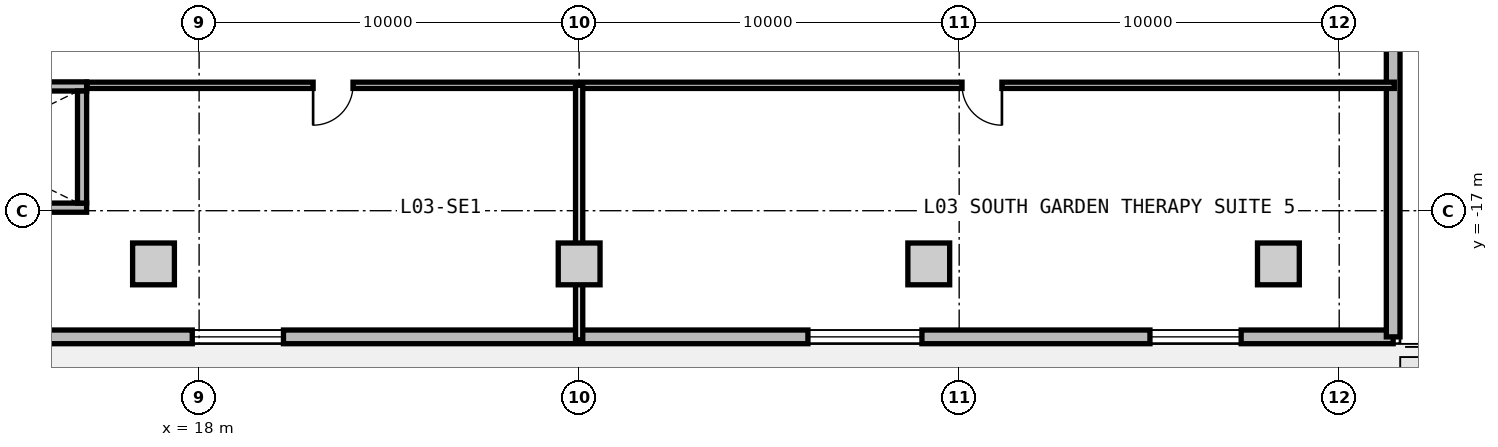
"""IFC4 building model, lengths in metres.
Left out: names, types, materials, properties, quantities, classifications, styles, units other than length and angle.
Written with IfcOpenShell. Run it as: python <this file> out.ifc"""

import sys

from ifc_helpers import new_model, si_unit, direction, frame, frame_2d, origin, origin_2d, place, context, subcontext, project, spatial, rectangle, extrude, source, transform, mapped, element, fill, save


model = new_model("IFC4")
c1 = context("Model", 3, precision=1e-05, world=origin(), true_north=direction((0.0, 1.0)))
c2 = subcontext(c1, "Body", "Model", "MODEL_VIEW")
j1 = project(units=[si_unit("LENGTHUNIT", "METRE"), si_unit("PLANEANGLEUNIT", "RADIAN")], contexts=[c1])
p1 = place(None, origin())
s1 = spatial("IfcSite", under=j1, at=p1, CompositionType="ELEMENT")
p2 = place(p1, origin())
s2 = spatial("IfcBuilding", under=s1, at=p2, CompositionType="ELEMENT")
p3 = place(p2, frame((0.0, 0.0, 12.6)))
s3 = spatial("IfcBuildingStorey", under=s2, at=p3, CompositionType="ELEMENT", Elevation=12.6)
m1 = source(origin(), c2, "Body", "SweptSolid", [
    extrude(rectangle(XDim=1.1, YDim=1.1, at=origin_2d()), origin(), (0.0, 0.0, 1.0), 4.2),
])
for number, where, z_axis, x_axis in (
    (1, (16.8, -18.4, 0.0), (0.0, 0.0, 1.0), (1.0, 0.0, 0.0)),
    (2, (28.0, -18.4, 0.0), (0.0, 0.0, 1.0), (1.0, 0.0, 0.0)),
    (3, (37.2, -18.4, 0.0), (0.0, 0.0, 1.0), (1.0, 0.0, 0.0)),
    (4, (46.4, -18.4, 0.0), (0.0, 0.0, 1.0), (1.0, 0.0, 0.0)),
):
    element("IfcColumn", number, at=place(p3, frame(where, z_axis=z_axis, x_axis=x_axis)), inside=s3, PredefinedType="COLUMN", context=c2, shape_type="MappedRepresentation", body=[
        mapped(m1, transform((0.0, 0.0, 0.0), x_axis=(1.0, 0.0, 0.0), y_axis=(0.0, 1.0, 0.0), z_axis=(0.0, 0.0, 1.0), scale=1.0)),
    ])
m2 = source(origin(), c2, "Body", "SweptSolid", [
    extrude(rectangle(XDim=98.84, YDim=0.36, at=frame_2d((49.42, 0.0))), origin(), (0.0, 0.0, 1.0), 3.88),
])
p4 = place(p3, frame((49.42, -20.32, 0.0), z_axis=(0.0, 0.0, 1.0), x_axis=(-1.0, 0.0, 0.0)))
e5 = element("IfcWall", 5, at=p4, inside=s3, PredefinedType="SOLIDWALL", context=c2, shape_type="MappedRepresentation", body=[
    mapped(m2, transform((0.0, 0.0, 0.0), x_axis=(1.0, 0.0, 0.0), y_axis=(0.0, 1.0, 0.0), z_axis=(0.0, 0.0, 1.0), scale=1.0)),
])
p5 = place(p4, frame((51.77, 0.0, 0.0)))
e6 = element("IfcOpeningElement", 6, at=p5, cuts=e5, PredefinedType="OPENING", context=c2, shape_type="SweptSolid", body=[
    extrude(rectangle(XDim=1.15, YDim=2.25, at=frame_2d((0.575, 1.125))), frame((0.0, 0.19, 0.0), z_axis=(0.0, -1.0, 0.0), x_axis=(1.0, 0.0, 0.0)), (0.0, 0.0, 1.0), 0.38),
])
p6 = place(p4, frame((4.0, 0.0, 0.85)))
e7 = element("IfcOpeningElement", 7, at=p6, cuts=e5, PredefinedType="OPENING", context=c2, shape_type="SweptSolid", body=[
    extrude(rectangle(XDim=2.4, YDim=2.2, at=frame_2d((1.2, 1.1))), frame((0.0, 0.19, 0.0), z_axis=(0.0, -1.0, 0.0), x_axis=(1.0, 0.0, 0.0)), (0.0, 0.0, 1.0), 0.38),
])
p7 = place(p4, frame((12.4, 0.0, 0.85)))
e8 = element("IfcOpeningElement", 8, at=p7, cuts=e5, PredefinedType="OPENING", context=c2, shape_type="SweptSolid", body=[
    extrude(rectangle(XDim=3.0, YDim=2.1, at=frame_2d((1.5, 1.05))), frame((0.0, 0.19, 0.0), z_axis=(0.0, -1.0, 0.0), x_axis=(1.0, 0.0, 0.0)), (0.0, 0.0, 1.0), 0.38),
])
p8 = place(p4, frame((29.2, 0.0, 0.85)))
e9 = element("IfcOpeningElement", 9, at=p8, cuts=e5, PredefinedType="OPENING", context=c2, shape_type="SweptSolid", body=[
    extrude(rectangle(XDim=2.4, YDim=2.2, at=frame_2d((1.2, 1.1))), frame((0.0, 0.19, 0.0), z_axis=(0.0, -1.0, 0.0), x_axis=(1.0, 0.0, 0.0)), (0.0, 0.0, 1.0), 0.38),
])
p9 = place(p4, frame((37.6, 0.0, 0.85)))
e10 = element("IfcOpeningElement", 10, at=p9, cuts=e5, PredefinedType="OPENING", context=c2, shape_type="SweptSolid", body=[
    extrude(rectangle(XDim=3.0, YDim=2.1, at=frame_2d((1.5, 1.05))), frame((0.0, 0.19, 0.0), z_axis=(0.0, -1.0, 0.0), x_axis=(1.0, 0.0, 0.0)), (0.0, 0.0, 1.0), 0.38),
])
p10 = place(p4, frame((62.8, 0.0, 0.85)))
e11 = element("IfcOpeningElement", 11, at=p10, cuts=e5, PredefinedType="OPENING", context=c2, shape_type="SweptSolid", body=[
    extrude(rectangle(XDim=3.0, YDim=2.1, at=frame_2d((1.5, 1.05))), frame((0.0, 0.19, 0.0), z_axis=(0.0, -1.0, 0.0), x_axis=(1.0, 0.0, 0.0)), (0.0, 0.0, 1.0), 0.38),
])
p11 = place(p4, frame((71.2, 0.0, 0.9)))
e12 = element("IfcOpeningElement", 12, at=p11, cuts=e5, PredefinedType="OPENING", context=c2, shape_type="SweptSolid", body=[
    extrude(rectangle(XDim=1.8, YDim=2.0, at=frame_2d((0.9, 1.0))), frame((0.0, 0.19, 0.0), z_axis=(0.0, -1.0, 0.0), x_axis=(1.0, 0.0, 0.0)), (0.0, 0.0, 1.0), 0.38),
])
p12 = place(p4, frame((79.6, 0.0, 0.85)))
e13 = element("IfcOpeningElement", 13, at=p12, cuts=e5, PredefinedType="OPENING", context=c2, shape_type="SweptSolid", body=[
    extrude(rectangle(XDim=2.4, YDim=2.2, at=frame_2d((1.2, 1.1))), frame((0.0, 0.19, 0.0), z_axis=(0.0, -1.0, 0.0), x_axis=(1.0, 0.0, 0.0)), (0.0, 0.0, 1.0), 0.38),
])
m3 = source(origin(), c2, "Body", "SweptSolid", [
    extrude(rectangle(XDim=40.64, YDim=0.36, at=frame_2d((20.32, 0.0))), origin(), (0.0, 0.0, 1.0), 3.88),
])
p13 = place(p3, frame((49.42, 20.32, 0.0), z_axis=(0.0, 0.0, 1.0), x_axis=(0.0, -1.0, 0.0)))
e14 = element("IfcWall", 14, at=p13, inside=s3, PredefinedType="SOLIDWALL", context=c2, shape_type="MappedRepresentation", body=[
    mapped(m3, transform((0.0, 0.0, 0.0), x_axis=(1.0, 0.0, 0.0), y_axis=(0.0, 1.0, 0.0), z_axis=(0.0, 0.0, 1.0), scale=1.0)),
])
p14 = place(p13, frame((4.0, 0.0, 0.85)))
e15 = element("IfcOpeningElement", 15, at=p14, cuts=e14, PredefinedType="OPENING", context=c2, shape_type="SweptSolid", body=[
    extrude(rectangle(XDim=2.4, YDim=2.2, at=frame_2d((1.2, 1.1))), frame((0.0, 0.19, 0.0), z_axis=(0.0, -1.0, 0.0), x_axis=(1.0, 0.0, 0.0)), (0.0, 0.0, 1.0), 0.38),
])
p15 = place(p13, frame((12.4, 0.0, 0.85)))
e16 = element("IfcOpeningElement", 16, at=p15, cuts=e14, PredefinedType="OPENING", context=c2, shape_type="SweptSolid", body=[
    extrude(rectangle(XDim=3.0, YDim=2.1, at=frame_2d((1.5, 1.05))), frame((0.0, 0.19, 0.0), z_axis=(0.0, -1.0, 0.0), x_axis=(1.0, 0.0, 0.0)), (0.0, 0.0, 1.0), 0.38),
])
p16 = place(p13, frame((29.2, 0.0, 0.85)))
e17 = element("IfcOpeningElement", 17, at=p16, cuts=e14, PredefinedType="OPENING", context=c2, shape_type="SweptSolid", body=[
    extrude(rectangle(XDim=2.4, YDim=2.2, at=frame_2d((1.2, 1.1))), frame((0.0, 0.19, 0.0), z_axis=(0.0, -1.0, 0.0), x_axis=(1.0, 0.0, 0.0)), (0.0, 0.0, 1.0), 0.38),
])
m4 = source(origin(), c2, "Body", "SweptSolid", [
    extrude(rectangle(XDim=7.88, YDim=0.24, at=frame_2d((3.94, 0.0))), origin(), (0.0, 0.0, 1.0), 3.88),
])
p17 = place(p3, frame((7.16, -13.73, 0.0), z_axis=(0.0, 0.0, 1.0), x_axis=(1.0, 0.0, 0.0)))
e18 = element("IfcWall", 18, at=p17, inside=s3, PredefinedType="PARTITIONING", context=c2, shape_type="MappedRepresentation", body=[
    mapped(m4, transform((0.0, 0.0, 0.0), x_axis=(1.0, 0.0, 0.0), y_axis=(0.0, 1.0, 0.0), z_axis=(0.0, 0.0, 1.0), scale=1.0)),
])
p18 = place(p17, frame((0.37, 0.0, 0.0)))
e19 = element("IfcOpeningElement", 19, at=p18, cuts=e18, PredefinedType="OPENING", context=c2, shape_type="SweptSolid", body=[
    extrude(rectangle(XDim=1.1, YDim=2.15, at=frame_2d((0.55, 1.075))), frame((0.0, 0.13, 0.0), z_axis=(0.0, -1.0, 0.0), x_axis=(1.0, 0.0, 0.0)), (0.0, 0.0, 1.0), 0.26),
])
p19 = place(p3, frame((7.16, -16.92, 0.0), z_axis=(0.0, 0.0, 1.0), x_axis=(1.0, 0.0, 0.0)))
e20 = element("IfcWall", 20, at=p19, inside=s3, PredefinedType="PARTITIONING", context=c2, shape_type="MappedRepresentation", body=[
    mapped(m4, transform((0.0, 0.0, 0.0), x_axis=(1.0, 0.0, 0.0), y_axis=(0.0, 1.0, 0.0), z_axis=(0.0, 0.0, 1.0), scale=1.0)),
])
m5 = source(origin(), c2, "Body", "SweptSolid", [
    extrude(rectangle(XDim=2.95, YDim=0.24, at=frame_2d((1.475, 0.0))), origin(), (0.0, 0.0, 1.0), 3.88),
])
p20 = place(p3, frame((14.92, -16.8, 0.0), z_axis=(0.0, 0.0, 1.0), x_axis=(0.0, 1.0, 0.0)))
e21 = element("IfcWall", 21, at=p20, inside=s3, PredefinedType="PARTITIONING", context=c2, shape_type="MappedRepresentation", body=[
    mapped(m5, transform((0.0, 0.0, 0.0), x_axis=(1.0, 0.0, 0.0), y_axis=(0.0, 1.0, 0.0), z_axis=(0.0, 0.0, 1.0), scale=1.0)),
])
m6 = source(origin(), c2, "Body", "SweptSolid", [
    extrude(rectangle(XDim=34.4, YDim=0.165, at=frame_2d((17.2, 0.0))), origin(), (0.0, 0.0, 1.0), 3.865),
])
p21 = place(p3, frame((15.05, -13.7, 0.0), z_axis=(0.0, 0.0, 1.0), x_axis=(1.0, 0.0, 0.0)))
e22 = element("IfcWall", 22, at=p21, inside=s3, PredefinedType="PARTITIONING", context=c2, shape_type="MappedRepresentation", body=[
    mapped(m6, transform((0.0, 0.0, 0.0), x_axis=(1.0, 0.0, 0.0), y_axis=(0.0, 1.0, 0.0), z_axis=(0.0, 0.0, 1.0), scale=1.0)),
])
p22 = place(p21, frame((5.95, 0.0, 0.0)))
e23 = element("IfcOpeningElement", 23, at=p22, cuts=e22, PredefinedType="OPENING", context=c2, shape_type="SweptSolid", body=[
    extrude(rectangle(XDim=1.05, YDim=2.15, at=frame_2d((0.525, 1.075))), frame((0.0, 0.093, 0.0), z_axis=(0.0, -1.0, 0.0), x_axis=(1.0, 0.0, 0.0)), (0.0, 0.0, 1.0), 0.185),
])
p23 = place(p21, frame((23.025, 0.0, 0.0)))
e24 = element("IfcOpeningElement", 24, at=p23, cuts=e22, PredefinedType="OPENING", context=c2, shape_type="SweptSolid", body=[
    extrude(rectangle(XDim=1.05, YDim=2.15, at=frame_2d((0.525, 1.075))), frame((0.0, 0.093, 0.0), z_axis=(0.0, -1.0, 0.0), x_axis=(1.0, 0.0, 0.0)), (0.0, 0.0, 1.0), 0.185),
])
m7 = source(origin(), c2, "Body", "SweptSolid", [
    extrude(rectangle(XDim=6.7, YDim=0.19, at=frame_2d((3.35, 0.0))), origin(), (0.0, 0.0, 1.0), 3.865),
])
p24 = place(p3, frame((28.0, -20.4, 0.0), z_axis=(0.0, 0.0, 1.0), x_axis=(0.0, 1.0, 0.0)))
e25 = element("IfcWall", 25, at=p24, inside=s3, PredefinedType="PARTITIONING", context=c2, shape_type="MappedRepresentation", body=[
    mapped(m7, transform((0.0, 0.0, 0.0), x_axis=(1.0, 0.0, 0.0), y_axis=(0.0, 1.0, 0.0), z_axis=(0.0, 0.0, 1.0), scale=1.0)),
])
m8 = source(origin(), c2, "Body", "SweptSolid", [
    extrude(rectangle(XDim=2.4, YDim=2.2, at=frame_2d((1.2, 1.1))), frame((0.0, 0.03, 0.0), z_axis=(0.0, -1.0, 0.0), x_axis=(1.0, 0.0, 0.0)), (0.0, 0.0, 1.0), 0.06),
])
p25 = place(p6, origin())
e26 = element("IfcWindow", 26, at=p25, inside=s3, PartitioningType="SINGLE_PANEL", PredefinedType="WINDOW", context=c2, shape_type="MappedRepresentation", body=[
    mapped(m8, transform((0.0, 0.0, 0.0), x_axis=(1.0, 0.0, 0.0), y_axis=(0.0, 1.0, 0.0), z_axis=(0.0, 0.0, 1.0), scale=1.0)),
])
fill(e7, e26)
m9 = source(origin(), c2, "Body", "SweptSolid", [
    extrude(rectangle(XDim=3.0, YDim=2.1, at=frame_2d((1.5, 1.05))), frame((0.0, 0.03, 0.0), z_axis=(0.0, -1.0, 0.0), x_axis=(1.0, 0.0, 0.0)), (0.0, 0.0, 1.0), 0.06),
])
p26 = place(p7, origin())
e27 = element("IfcWindow", 27, at=p26, inside=s3, PartitioningType="SINGLE_PANEL", PredefinedType="WINDOW", context=c2, shape_type="MappedRepresentation", body=[
    mapped(m9, transform((0.0, 0.0, 0.0), x_axis=(1.0, 0.0, 0.0), y_axis=(0.0, 1.0, 0.0), z_axis=(0.0, 0.0, 1.0), scale=1.0)),
])
fill(e8, e27)
p27 = place(p8, origin())
e28 = element("IfcWindow", 28, at=p27, inside=s3, PartitioningType="SINGLE_PANEL", PredefinedType="WINDOW", context=c2, shape_type="MappedRepresentation", body=[
    mapped(m8, transform((0.0, 0.0, 0.0), x_axis=(1.0, 0.0, 0.0), y_axis=(0.0, 1.0, 0.0), z_axis=(0.0, 0.0, 1.0), scale=1.0)),
])
fill(e9, e28)
m10 = source(origin(), c2, "Body", "SweptSolid", [
    extrude(rectangle(XDim=1.05, YDim=2.15, at=frame_2d((0.525, 1.075))), frame((0.0, 0.025, 0.0), z_axis=(0.0, -1.0, 0.0), x_axis=(1.0, 0.0, 0.0)), (0.0, 0.0, 1.0), 0.05),
])
p28 = place(p22, frame((1.05, 0.0, 0.0), z_axis=(0.0, 0.0, 1.0), x_axis=(-1.0, 0.0, 0.0)))
e29 = element("IfcDoor", 29, at=p28, inside=s3, OperationType="SINGLE_SWING_RIGHT", PredefinedType="DOOR", context=c2, shape_type="MappedRepresentation", body=[
    mapped(m10, transform((0.0, 0.0, 0.0), x_axis=(1.0, 0.0, 0.0), y_axis=(0.0, 1.0, 0.0), z_axis=(0.0, 0.0, 1.0), scale=1.0)),
])
fill(e23, e29)
p29 = place(p23, frame((1.05, 0.0, 0.0), z_axis=(0.0, 0.0, 1.0), x_axis=(-1.0, 0.0, 0.0)))
e30 = element("IfcDoor", 30, at=p29, inside=s3, OperationType="SINGLE_SWING_LEFT", PredefinedType="DOOR", context=c2, shape_type="MappedRepresentation", body=[
    mapped(m10, transform((0.0, 0.0, 0.0), x_axis=(1.0, 0.0, 0.0), y_axis=(0.0, 1.0, 0.0), z_axis=(0.0, 0.0, 1.0), scale=1.0)),
])
fill(e24, e30)
save(model, sys.argv[1])
